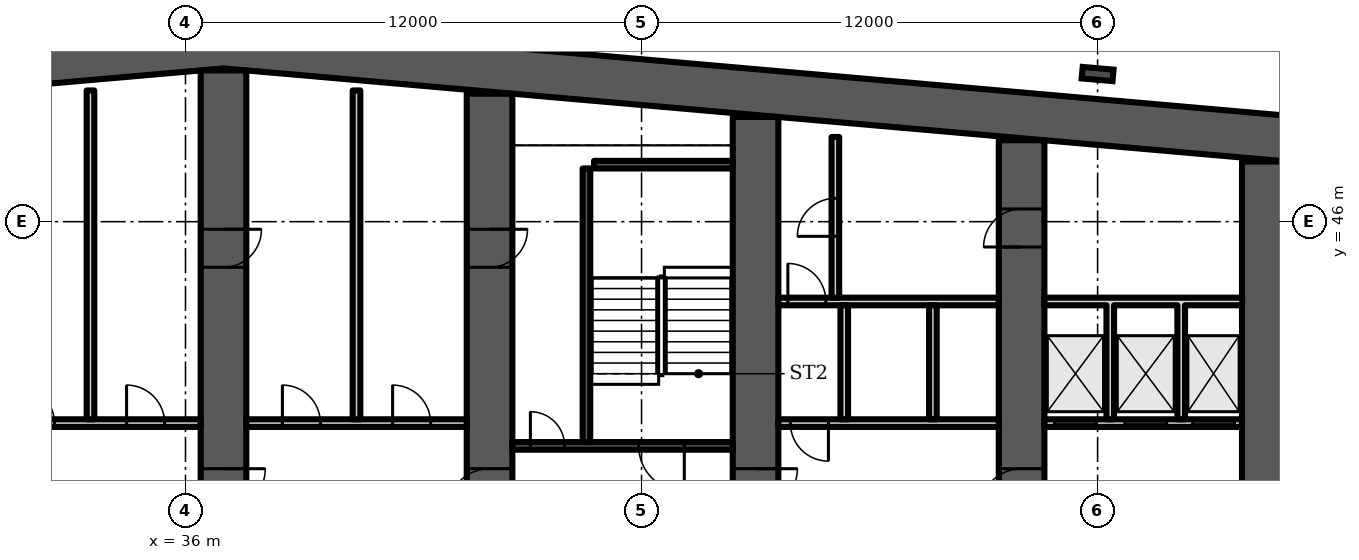
"""IFC4 building model, lengths in metres.
Left out: names, types, materials, properties, quantities, classifications, styles, units other than length and angle.
Written with IfcOpenShell. Run it as: python <this file> out.ifc"""

import sys

from ifc_helpers import new_model, si_unit, direction, frame, frame_2d, origin, origin_2d, place, context, subcontext, project, spatial, polyline, rectangle, i_section, outline, extrude, element, fill, save


model = new_model("IFC4")
c1 = context("Model", 3, precision=1e-05, world=origin(), true_north=direction((0.0, 1.0)))
c2 = subcontext(c1, "Body", "Model", "MODEL_VIEW")
j1 = project(units=[si_unit("LENGTHUNIT", "METRE"), si_unit("PLANEANGLEUNIT", "RADIAN")], contexts=[c1])
p1 = place(None, origin())
s1 = spatial("IfcSite", under=j1, at=p1, CompositionType="ELEMENT")
p2 = place(p1, origin())
s2 = spatial("IfcBuilding", under=s1, at=p2, CompositionType="ELEMENT")
p3 = place(p2, frame((0.0, 0.0, 70.3)))
s3 = spatial("IfcBuildingStorey", under=s2, at=p3, CompositionType="ELEMENT", Elevation=70.3)
p4 = place(p3, frame((0.0, 0.0, -0.0)))
e1 = element("IfcWall", 1, at=p4, inside=s3, PredefinedType="SHEAR", context=c2, shape_type="SweptSolid", body=[
    extrude(outline(polyline([(9.0, 47.583), (37.0, 50.032), (65.0, 47.583), (65.0, 48.787), (37.0, 51.237), (9.0, 48.787), (9.0, 47.583)])), origin(), (0.0, 0.0, 1.0), 3.6),
])
p5 = place(p3, frame((37.0, 35.2, 0.0), z_axis=(0.0, 0.0, 1.0), x_axis=(0.0, 1.0, 0.0)))
e2 = element("IfcWall", 2, at=p5, inside=s3, PredefinedType="SHEAR", context=c2, shape_type="SweptSolid", body=[
    extrude(rectangle(XDim=14.78, YDim=1.2, at=frame_2d((7.39, 0.0))), origin(), (0.0, 0.0, 1.0), 3.6),
])
p6 = place(p5, frame((3.2, 0.0, 0.0)))
e3 = element("IfcOpeningElement", 3, at=p6, cuts=e2, PredefinedType="OPENING", context=c2, shape_type="SweptSolid", body=[
    extrude(rectangle(XDim=1.1, YDim=2.1, at=frame_2d((0.55, 1.05))), frame((0.0, 0.61, 0.0), z_axis=(0.0, -1.0, 0.0), x_axis=(1.0, 0.0, 0.0)), (0.0, 0.0, 1.0), 1.22),
])
p7 = place(p5, frame((9.6, 0.0, 0.0)))
e4 = element("IfcOpeningElement", 4, at=p7, cuts=e2, PredefinedType="OPENING", context=c2, shape_type="SweptSolid", body=[
    extrude(rectangle(XDim=1.0, YDim=2.1, at=frame_2d((0.5, 1.05))), frame((0.0, 0.61, 0.0), z_axis=(0.0, -1.0, 0.0), x_axis=(1.0, 0.0, 0.0)), (0.0, 0.0, 1.0), 1.22),
])
p8 = place(p3, frame((44.0, 35.2, 0.0), z_axis=(0.0, 0.0, 1.0), x_axis=(0.0, 1.0, 0.0)))
e5 = element("IfcWall", 5, at=p8, inside=s3, PredefinedType="SHEAR", context=c2, shape_type="SweptSolid", body=[
    extrude(rectangle(XDim=14.168, YDim=1.2, at=frame_2d((7.084, 0.0))), origin(), (0.0, 0.0, 1.0), 3.6),
])
p9 = place(p8, frame((3.2, 0.0, 0.0)))
e6 = element("IfcOpeningElement", 6, at=p9, cuts=e5, PredefinedType="OPENING", context=c2, shape_type="SweptSolid", body=[
    extrude(rectangle(XDim=1.1, YDim=2.1, at=frame_2d((0.55, 1.05))), frame((0.0, 0.61, 0.0), z_axis=(0.0, -1.0, 0.0), x_axis=(1.0, 0.0, 0.0)), (0.0, 0.0, 1.0), 1.22),
])
p10 = place(p8, frame((9.6, 0.0, 0.0)))
e7 = element("IfcOpeningElement", 7, at=p10, cuts=e5, PredefinedType="OPENING", context=c2, shape_type="SweptSolid", body=[
    extrude(rectangle(XDim=1.0, YDim=2.1, at=frame_2d((0.5, 1.05))), frame((0.0, 0.61, 0.0), z_axis=(0.0, -1.0, 0.0), x_axis=(1.0, 0.0, 0.0)), (0.0, 0.0, 1.0), 1.22),
])
p11 = place(p3, frame((51.0, 35.2, 0.0), z_axis=(0.0, 0.0, 1.0), x_axis=(0.0, 1.0, 0.0)))
e8 = element("IfcWall", 8, at=p11, inside=s3, PredefinedType="SHEAR", context=c2, shape_type="SweptSolid", body=[
    extrude(rectangle(XDim=13.555, YDim=1.2, at=frame_2d((6.778, 0.0))), origin(), (0.0, 0.0, 1.0), 3.6),
])
p12 = place(p11, frame((3.2, 0.0, 0.0)))
e9 = element("IfcOpeningElement", 9, at=p12, cuts=e8, PredefinedType="OPENING", context=c2, shape_type="SweptSolid", body=[
    extrude(rectangle(XDim=1.1, YDim=2.1, at=frame_2d((0.55, 1.05))), frame((0.0, 0.61, 0.0), z_axis=(0.0, -1.0, 0.0), x_axis=(1.0, 0.0, 0.0)), (0.0, 0.0, 1.0), 1.22),
])
p13 = place(p3, frame((58.0, 35.2, 0.0), z_axis=(0.0, 0.0, 1.0), x_axis=(0.0, 1.0, 0.0)))
e10 = element("IfcWall", 10, at=p13, inside=s3, PredefinedType="SHEAR", context=c2, shape_type="SweptSolid", body=[
    extrude(rectangle(XDim=12.943, YDim=1.2, at=frame_2d((6.471, 0.0))), origin(), (0.0, 0.0, 1.0), 3.6),
])
p14 = place(p13, frame((10.134, 0.0, 0.0)))
e11 = element("IfcOpeningElement", 11, at=p14, cuts=e10, PredefinedType="OPENING", context=c2, shape_type="SweptSolid", body=[
    extrude(rectangle(XDim=1.0, YDim=2.1, at=frame_2d((0.5, 1.05))), frame((0.0, 0.61, 0.0), z_axis=(0.0, -1.0, 0.0), x_axis=(1.0, 0.0, 0.0)), (0.0, 0.0, 1.0), 1.22),
])
p15 = place(p13, frame((3.2, 0.0, 0.0)))
e12 = element("IfcOpeningElement", 12, at=p15, cuts=e10, PredefinedType="OPENING", context=c2, shape_type="SweptSolid", body=[
    extrude(rectangle(XDim=1.1, YDim=2.1, at=frame_2d((0.55, 1.05))), frame((0.0, 0.61, 0.0), z_axis=(0.0, -1.0, 0.0), x_axis=(1.0, 0.0, 0.0)), (0.0, 0.0, 1.0), 1.22),
])
p16 = place(p3, frame((64.4, 35.2, 0.0), z_axis=(0.0, 0.0, 1.0), x_axis=(0.0, 1.0, 0.0)))
e13 = element("IfcWall", 13, at=p16, inside=s3, PredefinedType="SHEAR", context=c2, shape_type="SweptSolid", body=[
    extrude(rectangle(XDim=12.383, YDim=1.2, at=frame_2d((6.191, 0.0))), origin(), (0.0, 0.0, 1.0), 3.6),
])
p17 = place(p3, frame((60.0, 49.885, 0.0), z_axis=(0.0, 0.0, 1.0), x_axis=(0.087156, 0.996197, 0.0)))
e14 = element("IfcColumn", 14, at=p17, inside=s3, PredefinedType="COLUMN", context=c2, shape_type="SweptSolid", body=[
    extrude(i_section(OverallWidth=0.303, OverallDepth=0.814, WebThickness=0.021, FlangeThickness=0.04, FilletRadius=0.03, at=origin_2d()), origin(), (0.0, 0.0, 1.0), 3.6),
])
p18 = place(p3, frame((30.6, 40.7, 0.0), z_axis=(0.0, 0.0, 1.0), x_axis=(1.0, 0.0, 0.0)))
e15 = element("IfcWall", 15, at=p18, inside=s3, PredefinedType="PARTITIONING", context=c2, shape_type="SweptSolid", body=[
    extrude(rectangle(XDim=5.8, YDim=0.2, at=frame_2d((2.9, 0.0))), origin(), (0.0, 0.0, 1.0), 3.2),
])
p19 = place(p18, frame((0.95, 0.0, 0.0)))
e16 = element("IfcOpeningElement", 16, at=p19, cuts=e15, PredefinedType="OPENING", context=c2, shape_type="SweptSolid", body=[
    extrude(rectangle(XDim=1.0, YDim=2.1, at=frame_2d((0.5, 1.05))), frame((0.0, 0.11, 0.0), z_axis=(0.0, -1.0, 0.0), x_axis=(1.0, 0.0, 0.0)), (0.0, 0.0, 1.0), 0.22),
])
p20 = place(p18, frame((3.85, 0.0, 0.0)))
e17 = element("IfcOpeningElement", 17, at=p20, cuts=e15, PredefinedType="OPENING", context=c2, shape_type="SweptSolid", body=[
    extrude(rectangle(XDim=1.0, YDim=2.1, at=frame_2d((0.5, 1.05))), frame((0.0, 0.11, 0.0), z_axis=(0.0, -1.0, 0.0), x_axis=(1.0, 0.0, 0.0)), (0.0, 0.0, 1.0), 0.22),
])
p21 = place(p3, frame((33.5, 40.8, 0.0), z_axis=(0.0, 0.0, 1.0), x_axis=(0.0, 1.0, 0.0)))
e18 = element("IfcWall", 18, at=p21, inside=s3, PredefinedType="PARTITIONING", context=c2, shape_type="SweptSolid", body=[
    extrude(rectangle(XDim=8.653, YDim=0.2, at=frame_2d((4.326, 0.0))), origin(), (0.0, 0.0, 1.0), 3.2),
])
p22 = place(p3, frame((37.6, 40.7, 0.0), z_axis=(0.0, 0.0, 1.0), x_axis=(1.0, 0.0, 0.0)))
e19 = element("IfcWall", 19, at=p22, inside=s3, PredefinedType="PARTITIONING", context=c2, shape_type="SweptSolid", body=[
    extrude(rectangle(XDim=5.8, YDim=0.2, at=frame_2d((2.9, 0.0))), origin(), (0.0, 0.0, 1.0), 3.2),
])
p23 = place(p22, frame((0.95, 0.0, 0.0)))
e20 = element("IfcOpeningElement", 20, at=p23, cuts=e19, PredefinedType="OPENING", context=c2, shape_type="SweptSolid", body=[
    extrude(rectangle(XDim=1.0, YDim=2.1, at=frame_2d((0.5, 1.05))), frame((0.0, 0.11, 0.0), z_axis=(0.0, -1.0, 0.0), x_axis=(1.0, 0.0, 0.0)), (0.0, 0.0, 1.0), 0.22),
])
p24 = place(p22, frame((3.85, 0.0, 0.0)))
e21 = element("IfcOpeningElement", 21, at=p24, cuts=e19, PredefinedType="OPENING", context=c2, shape_type="SweptSolid", body=[
    extrude(rectangle(XDim=1.0, YDim=2.1, at=frame_2d((0.5, 1.05))), frame((0.0, 0.11, 0.0), z_axis=(0.0, -1.0, 0.0), x_axis=(1.0, 0.0, 0.0)), (0.0, 0.0, 1.0), 0.22),
])
p25 = place(p3, frame((40.5, 40.8, 0.0), z_axis=(0.0, 0.0, 1.0), x_axis=(0.0, 1.0, 0.0)))
e22 = element("IfcWall", 22, at=p25, inside=s3, PredefinedType="PARTITIONING", context=c2, shape_type="SweptSolid", body=[
    extrude(rectangle(XDim=8.653, YDim=0.2, at=frame_2d((4.326, 0.0))), origin(), (0.0, 0.0, 1.0), 3.2),
])
p26 = place(p3, frame((44.6, 40.1, 0.0), z_axis=(0.0, 0.0, 1.0), x_axis=(1.0, 0.0, 0.0)))
e23 = element("IfcWall", 23, at=p26, inside=s3, PredefinedType="SHEAR", context=c2, shape_type="SweptSolid", body=[
    extrude(rectangle(XDim=5.8, YDim=0.2, at=frame_2d((2.9, 0.0))), origin(), (0.0, 0.0, 1.0), 3.2),
])
p27 = place(p26, frame((3.325, 0.0, 0.0)))
e24 = element("IfcOpeningElement", 24, at=p27, cuts=e23, PredefinedType="OPENING", context=c2, shape_type="SweptSolid", body=[
    extrude(rectangle(XDim=1.2, YDim=2.1, at=frame_2d((0.6, 1.05))), frame((0.0, 0.11, 0.0), z_axis=(0.0, -1.0, 0.0), x_axis=(1.0, 0.0, 0.0)), (0.0, 0.0, 1.0), 0.22),
])
p28 = place(p26, frame((0.475, 0.0, 0.0)))
e25 = element("IfcOpeningElement", 25, at=p28, cuts=e23, PredefinedType="OPENING", context=c2, shape_type="SweptSolid", body=[
    extrude(rectangle(XDim=0.9, YDim=2.1, at=frame_2d((0.45, 1.05))), frame((0.0, 0.11, 0.0), z_axis=(0.0, -1.0, 0.0), x_axis=(1.0, 0.0, 0.0)), (0.0, 0.0, 1.0), 0.22),
])
p29 = place(p3, frame((46.55, 40.2, 0.0), z_axis=(0.0, 0.0, 1.0), x_axis=(0.0, 1.0, 0.0)))
e26 = element("IfcWall", 26, at=p29, inside=s3, PredefinedType="SHEAR", context=c2, shape_type="SweptSolid", body=[
    extrude(rectangle(XDim=7.2, YDim=0.2, at=frame_2d((3.6, 0.0))), origin(), (0.0, 0.0, 1.0), 3.2),
])
p30 = place(p3, frame((46.75, 47.5, 0.0), z_axis=(0.0, 0.0, 1.0), x_axis=(1.0, 0.0, 0.0)))
e27 = element("IfcWall", 27, at=p30, inside=s3, PredefinedType="SHEAR", context=c2, shape_type="SweptSolid", body=[
    extrude(rectangle(XDim=3.65, YDim=0.2, at=frame_2d((1.825, 0.0))), origin(), (0.0, 0.0, 1.0), 3.2),
])
p31 = place(p3, frame((51.6, 40.7, 0.0), z_axis=(0.0, 0.0, 1.0), x_axis=(1.0, 0.0, 0.0)))
e28 = element("IfcWall", 28, at=p31, inside=s3, PredefinedType="PARTITIONING", context=c2, shape_type="SweptSolid", body=[
    extrude(rectangle(XDim=5.8, YDim=0.2, at=frame_2d((2.9, 0.0))), origin(), (0.0, 0.0, 1.0), 3.2),
])
p32 = place(p31, frame((0.317, 0.0, 0.0)))
e29 = element("IfcOpeningElement", 29, at=p32, cuts=e28, PredefinedType="OPENING", context=c2, shape_type="SweptSolid", body=[
    extrude(rectangle(XDim=1.0, YDim=2.1, at=frame_2d((0.5, 1.05))), frame((0.0, 0.11, 0.0), z_axis=(0.0, -1.0, 0.0), x_axis=(1.0, 0.0, 0.0)), (0.0, 0.0, 1.0), 0.22),
])
p33 = place(p3, frame((51.6, 43.9, 0.0), z_axis=(0.0, 0.0, 1.0), x_axis=(1.0, 0.0, 0.0)))
e30 = element("IfcWall", 30, at=p33, inside=s3, PredefinedType="PARTITIONING", context=c2, shape_type="SweptSolid", body=[
    extrude(rectangle(XDim=5.8, YDim=0.2, at=frame_2d((2.9, 0.0))), origin(), (0.0, 0.0, 1.0), 3.2),
])
p34 = place(p33, frame((0.25, 0.0, 0.0)))
e31 = element("IfcOpeningElement", 31, at=p34, cuts=e30, PredefinedType="OPENING", context=c2, shape_type="SweptSolid", body=[
    extrude(rectangle(XDim=1.0, YDim=2.1, at=frame_2d((0.5, 1.05))), frame((0.0, 0.11, 0.0), z_axis=(0.0, -1.0, 0.0), x_axis=(1.0, 0.0, 0.0)), (0.0, 0.0, 1.0), 0.22),
])
p35 = place(p3, frame((0.0, 0.0, -0.0)))
e32 = element("IfcWall", 32, at=p35, inside=s3, PredefinedType="PARTITIONING", context=c2, shape_type="SweptSolid", body=[
    extrude(outline(polyline([(53.233, 40.8), (53.233, 43.8), (53.433, 43.8), (53.433, 40.8), (53.233, 40.8)])), origin(), (0.0, 0.0, 1.0), 3.2),
])
p36 = place(p3, frame((0.0, 0.0, -0.0)))
e33 = element("IfcWall", 33, at=p36, inside=s3, PredefinedType="PARTITIONING", context=c2, shape_type="SweptSolid", body=[
    extrude(outline(polyline([(55.567, 40.8), (55.567, 43.8), (55.767, 43.8), (55.767, 40.8), (55.567, 40.8)])), origin(), (0.0, 0.0, 1.0), 3.2),
])
p37 = place(p3, frame((53.1, 44.0, 0.0), z_axis=(0.0, 0.0, 1.0), x_axis=(0.0, 1.0, 0.0)))
e34 = element("IfcWall", 34, at=p37, inside=s3, PredefinedType="PARTITIONING", context=c2, shape_type="SweptSolid", body=[
    extrude(rectangle(XDim=4.228, YDim=0.2, at=frame_2d((2.114, 0.0))), origin(), (0.0, 0.0, 1.0), 3.2),
])
p38 = place(p37, frame((1.614, 0.0, 0.0)))
e35 = element("IfcOpeningElement", 35, at=p38, cuts=e34, PredefinedType="OPENING", context=c2, shape_type="SweptSolid", body=[
    extrude(rectangle(XDim=1.0, YDim=2.1, at=frame_2d((0.5, 1.05))), frame((0.0, 0.11, 0.0), z_axis=(0.0, -1.0, 0.0), x_axis=(1.0, 0.0, 0.0)), (0.0, 0.0, 1.0), 0.22),
])
p39 = place(p3, frame((58.6, 40.7, 0.0), z_axis=(0.0, 0.0, 1.0), x_axis=(1.0, 0.0, 0.0)))
e36 = element("IfcWall", 36, at=p39, inside=s3, PredefinedType="PARTITIONING", context=c2, shape_type="SweptSolid", body=[
    extrude(rectangle(XDim=5.2, YDim=0.2, at=frame_2d((2.6, 0.0))), origin(), (0.0, 0.0, 1.0), 3.2),
])
p40 = place(p39, frame((0.267, 0.0, 0.0)))
e37 = element("IfcOpeningElement", 37, at=p40, cuts=e36, PredefinedType="OPENING", context=c2, shape_type="SweptSolid", body=[
    extrude(rectangle(XDim=1.1, YDim=2.1, at=frame_2d((0.55, 1.05))), frame((0.0, 0.11, 0.0), z_axis=(0.0, -1.0, 0.0), x_axis=(1.0, 0.0, 0.0)), (0.0, 0.0, 1.0), 0.22),
])
p41 = place(p39, frame((2.117, 0.0, 0.0)))
e38 = element("IfcOpeningElement", 38, at=p41, cuts=e36, PredefinedType="OPENING", context=c2, shape_type="SweptSolid", body=[
    extrude(rectangle(XDim=1.1, YDim=2.1, at=frame_2d((0.55, 1.05))), frame((0.0, 0.11, 0.0), z_axis=(0.0, -1.0, 0.0), x_axis=(1.0, 0.0, 0.0)), (0.0, 0.0, 1.0), 0.22),
])
p42 = place(p39, frame((3.9, 0.0, 0.0)))
e39 = element("IfcOpeningElement", 39, at=p42, cuts=e36, PredefinedType="OPENING", context=c2, shape_type="SweptSolid", body=[
    extrude(rectangle(XDim=1.1, YDim=2.1, at=frame_2d((0.55, 1.05))), frame((0.0, 0.11, 0.0), z_axis=(0.0, -1.0, 0.0), x_axis=(1.0, 0.0, 0.0)), (0.0, 0.0, 1.0), 0.22),
])
p43 = place(p3, frame((0.0, 0.0, -0.0)))
e40 = element("IfcWall", 40, at=p43, inside=s3, PredefinedType="PARTITIONING", context=c2, shape_type="SweptSolid", body=[
    extrude(outline(polyline([(60.433, 40.8), (60.233, 40.8), (60.233, 43.8), (58.6, 43.8), (58.6, 44.0), (63.8, 44.0), (63.8, 43.8), (62.3, 43.8), (62.3, 40.8), (62.1, 40.8), (62.1, 43.8), (60.433, 43.8), (60.433, 40.8)])), origin(), (0.0, 0.0, 1.0), 3.2),
])
p44 = place(p19, origin())
e41 = element("IfcDoor", 41, at=p44, inside=s3, OperationType="SINGLE_SWING_LEFT", PredefinedType="DOOR", context=c2, shape_type="SweptSolid", body=[
    extrude(rectangle(XDim=1.0, YDim=2.1, at=frame_2d((0.5, 1.05))), frame((0.0, 0.025, 0.0), z_axis=(0.0, -1.0, 0.0), x_axis=(1.0, 0.0, 0.0)), (0.0, 0.0, 1.0), 0.05),
])
fill(e16, e41)
p45 = place(p20, origin())
e42 = element("IfcDoor", 42, at=p45, inside=s3, OperationType="SINGLE_SWING_LEFT", PredefinedType="DOOR", context=c2, shape_type="SweptSolid", body=[
    extrude(rectangle(XDim=1.0, YDim=2.1, at=frame_2d((0.5, 1.05))), frame((0.0, 0.025, 0.0), z_axis=(0.0, -1.0, 0.0), x_axis=(1.0, 0.0, 0.0)), (0.0, 0.0, 1.0), 0.05),
])
fill(e17, e42)
p46 = place(p23, origin())
e43 = element("IfcDoor", 43, at=p46, inside=s3, OperationType="SINGLE_SWING_LEFT", PredefinedType="DOOR", context=c2, shape_type="SweptSolid", body=[
    extrude(rectangle(XDim=1.0, YDim=2.1, at=frame_2d((0.5, 1.05))), frame((0.0, 0.025, 0.0), z_axis=(0.0, -1.0, 0.0), x_axis=(1.0, 0.0, 0.0)), (0.0, 0.0, 1.0), 0.05),
])
fill(e20, e43)
p47 = place(p24, origin())
e44 = element("IfcDoor", 44, at=p47, inside=s3, OperationType="SINGLE_SWING_LEFT", PredefinedType="DOOR", context=c2, shape_type="SweptSolid", body=[
    extrude(rectangle(XDim=1.0, YDim=2.1, at=frame_2d((0.5, 1.05))), frame((0.0, 0.025, 0.0), z_axis=(0.0, -1.0, 0.0), x_axis=(1.0, 0.0, 0.0)), (0.0, 0.0, 1.0), 0.05),
])
fill(e21, e44)
p48 = place(p27, origin())
e45 = element("IfcDoor", 45, at=p48, inside=s3, OperationType="SINGLE_SWING_RIGHT", PredefinedType="DOOR", context=c2, shape_type="SweptSolid", body=[
    extrude(rectangle(XDim=1.2, YDim=2.1, at=frame_2d((0.6, 1.05))), frame((0.0, 0.025, 0.0), z_axis=(0.0, -1.0, 0.0), x_axis=(1.0, 0.0, 0.0)), (0.0, 0.0, 1.0), 0.05),
])
fill(e24, e45)
p49 = place(p28, origin())
e46 = element("IfcDoor", 46, at=p49, inside=s3, OperationType="SINGLE_SWING_LEFT", PredefinedType="DOOR", context=c2, shape_type="SweptSolid", body=[
    extrude(rectangle(XDim=0.9, YDim=2.1, at=frame_2d((0.45, 1.05))), frame((0.0, 0.025, 0.0), z_axis=(0.0, -1.0, 0.0), x_axis=(1.0, 0.0, 0.0)), (0.0, 0.0, 1.0), 0.05),
])
fill(e25, e46)
p50 = place(p32, origin())
e47 = element("IfcDoor", 47, at=p50, inside=s3, OperationType="SINGLE_SWING_RIGHT", PredefinedType="DOOR", context=c2, shape_type="SweptSolid", body=[
    extrude(rectangle(XDim=1.0, YDim=2.1, at=frame_2d((0.5, 1.05))), frame((0.0, 0.025, 0.0), z_axis=(0.0, -1.0, 0.0), x_axis=(1.0, 0.0, 0.0)), (0.0, 0.0, 1.0), 0.05),
])
fill(e29, e47)
p51 = place(p34, origin())
e48 = element("IfcDoor", 48, at=p51, inside=s3, OperationType="SINGLE_SWING_LEFT", PredefinedType="DOOR", context=c2, shape_type="SweptSolid", body=[
    extrude(rectangle(XDim=1.0, YDim=2.1, at=frame_2d((0.5, 1.05))), frame((0.0, 0.025, 0.0), z_axis=(0.0, -1.0, 0.0), x_axis=(1.0, 0.0, 0.0)), (0.0, 0.0, 1.0), 0.05),
])
fill(e31, e48)
p52 = place(p38, origin())
e49 = element("IfcDoor", 49, at=p52, inside=s3, OperationType="SINGLE_SWING_LEFT", PredefinedType="DOOR", context=c2, shape_type="SweptSolid", body=[
    extrude(rectangle(XDim=1.0, YDim=2.1, at=frame_2d((0.5, 1.05))), frame((0.0, 0.025, 0.0), z_axis=(0.0, -1.0, 0.0), x_axis=(1.0, 0.0, 0.0)), (0.0, 0.0, 1.0), 0.05),
])
fill(e35, e49)
p53 = place(p40, origin())
e50 = element("IfcDoor", 50, at=p53, inside=s3, OperationType="DOUBLE_DOOR_SLIDING", PredefinedType="DOOR", context=c2, shape_type="SweptSolid", body=[
    extrude(rectangle(XDim=1.1, YDim=2.1, at=frame_2d((0.55, 1.05))), frame((0.0, 0.025, 0.0), z_axis=(0.0, -1.0, 0.0), x_axis=(1.0, 0.0, 0.0)), (0.0, 0.0, 1.0), 0.05),
])
fill(e37, e50)
p54 = place(p41, origin())
e51 = element("IfcDoor", 51, at=p54, inside=s3, OperationType="DOUBLE_DOOR_SLIDING", PredefinedType="DOOR", context=c2, shape_type="SweptSolid", body=[
    extrude(rectangle(XDim=1.1, YDim=2.1, at=frame_2d((0.55, 1.05))), frame((0.0, 0.025, 0.0), z_axis=(0.0, -1.0, 0.0), x_axis=(1.0, 0.0, 0.0)), (0.0, 0.0, 1.0), 0.05),
])
fill(e38, e51)
p55 = place(p42, origin())
e52 = element("IfcDoor", 52, at=p55, inside=s3, OperationType="DOUBLE_DOOR_SLIDING", PredefinedType="DOOR", context=c2, shape_type="SweptSolid", body=[
    extrude(rectangle(XDim=1.1, YDim=2.1, at=frame_2d((0.55, 1.05))), frame((0.0, 0.025, 0.0), z_axis=(0.0, -1.0, 0.0), x_axis=(1.0, 0.0, 0.0)), (0.0, 0.0, 1.0), 0.05),
])
fill(e39, e52)
p56 = place(p14, origin())
e53 = element("IfcDoor", 53, at=p56, inside=s3, OperationType="SINGLE_SWING_LEFT", PredefinedType="DOOR", context=c2, shape_type="SweptSolid", body=[
    extrude(rectangle(XDim=1.0, YDim=2.1, at=frame_2d((0.5, 1.05))), frame((0.0, 0.6, 0.0), z_axis=(0.0, -1.0, 0.0), x_axis=(1.0, 0.0, 0.0)), (0.0, 0.0, 1.0), 1.199),
])
fill(e11, e53)
p57 = place(p6, origin())
e54 = element("IfcDoor", 54, at=p57, inside=s3, OperationType="SINGLE_SWING_RIGHT", PredefinedType="DOOR", context=c2, shape_type="SweptSolid", body=[
    extrude(rectangle(XDim=1.1, YDim=2.1, at=frame_2d((0.55, 1.05))), frame((0.0, 0.025, 0.0), z_axis=(0.0, -1.0, 0.0), x_axis=(1.0, 0.0, 0.0)), (0.0, 0.0, 1.0), 0.05),
])
fill(e3, e54)
p58 = place(p7, origin())
e55 = element("IfcDoor", 55, at=p58, inside=s3, OperationType="SINGLE_SWING_RIGHT", PredefinedType="DOOR", context=c2, shape_type="SweptSolid", body=[
    extrude(rectangle(XDim=1.0, YDim=2.1, at=frame_2d((0.5, 1.05))), frame((0.0, 0.6, 0.0), z_axis=(0.0, -1.0, 0.0), x_axis=(1.0, 0.0, 0.0)), (0.0, 0.0, 1.0), 1.199),
])
fill(e4, e55)
p59 = place(p9, origin())
e56 = element("IfcDoor", 56, at=p59, inside=s3, OperationType="SINGLE_SWING_LEFT", PredefinedType="DOOR", context=c2, shape_type="SweptSolid", body=[
    extrude(rectangle(XDim=1.1, YDim=2.1, at=frame_2d((0.55, 1.05))), frame((0.0, 0.025, 0.0), z_axis=(0.0, -1.0, 0.0), x_axis=(1.0, 0.0, 0.0)), (0.0, 0.0, 1.0), 0.05),
])
fill(e6, e56)
p60 = place(p10, origin())
e57 = element("IfcDoor", 57, at=p60, inside=s3, OperationType="SINGLE_SWING_RIGHT", PredefinedType="DOOR", context=c2, shape_type="SweptSolid", body=[
    extrude(rectangle(XDim=1.0, YDim=2.1, at=frame_2d((0.5, 1.05))), frame((0.0, 0.6, 0.0), z_axis=(0.0, -1.0, 0.0), x_axis=(1.0, 0.0, 0.0)), (0.0, 0.0, 1.0), 1.199),
])
fill(e7, e57)
p61 = place(p12, origin())
e58 = element("IfcDoor", 58, at=p61, inside=s3, OperationType="SINGLE_SWING_RIGHT", PredefinedType="DOOR", context=c2, shape_type="SweptSolid", body=[
    extrude(rectangle(XDim=1.1, YDim=2.1, at=frame_2d((0.55, 1.05))), frame((0.0, 0.025, 0.0), z_axis=(0.0, -1.0, 0.0), x_axis=(1.0, 0.0, 0.0)), (0.0, 0.0, 1.0), 0.05),
])
fill(e9, e58)
p62 = place(p15, origin())
e59 = element("IfcDoor", 59, at=p62, inside=s3, OperationType="SINGLE_SWING_LEFT", PredefinedType="DOOR", context=c2, shape_type="SweptSolid", body=[
    extrude(rectangle(XDim=1.1, YDim=2.1, at=frame_2d((0.55, 1.05))), frame((0.0, 0.025, 0.0), z_axis=(0.0, -1.0, 0.0), x_axis=(1.0, 0.0, 0.0)), (0.0, 0.0, 1.0), 0.05),
])
fill(e12, e59)
save(model, sys.argv[1])
